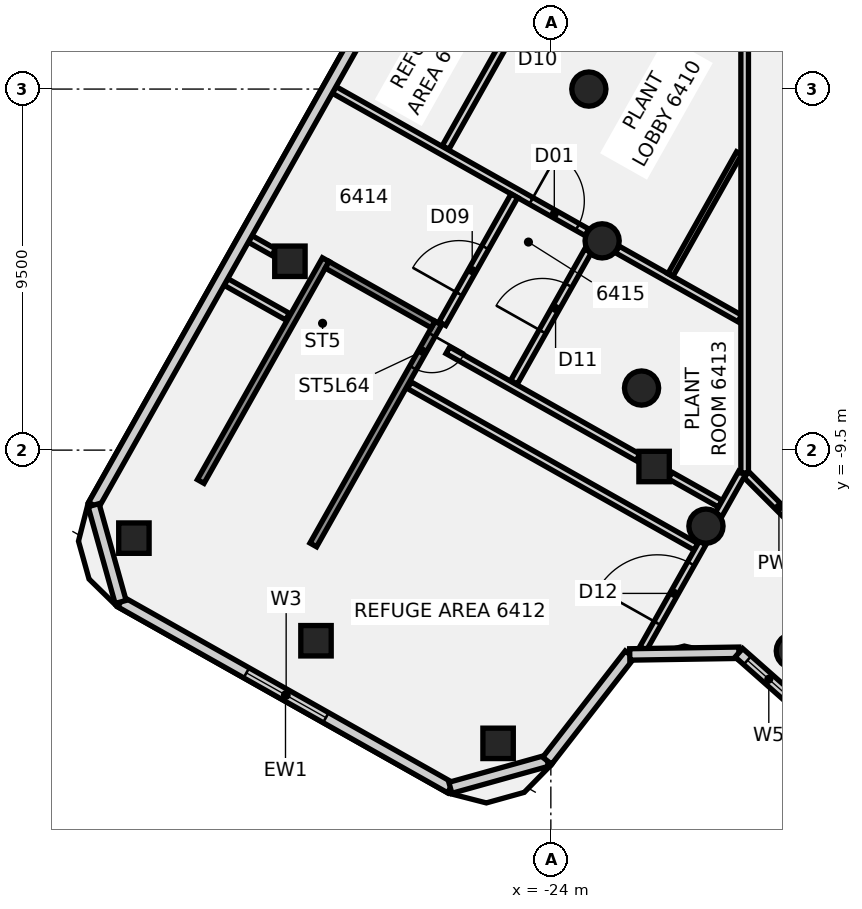
"""IFC4 building model, lengths in metres.
Left out: names, types, materials, properties, quantities, classifications, styles, units other than length and angle.
Written with IfcOpenShell. Run it as: python <this file> out.ifc"""

import sys

from ifc_helpers import new_model, si_unit, direction, frame, frame_2d, origin, origin_2d, place, context, subcontext, project, spatial, polyline, rectangle, circle, outline, extrude, element, fill, save


model = new_model("IFC4")
c1 = context("Model", 3, precision=1e-05, world=origin(), true_north=direction((0.0, 1.0)))
c2 = subcontext(c1, "Body", "Model", "MODEL_VIEW")
j1 = project(units=[si_unit("LENGTHUNIT", "METRE"), si_unit("PLANEANGLEUNIT", "RADIAN")], contexts=[c1])
p1 = place(None, origin())
s1 = spatial("IfcSite", under=j1, at=p1, CompositionType="ELEMENT")
p2 = place(p1, origin())
s2 = spatial("IfcBuilding", under=s1, at=p2, CompositionType="ELEMENT")
p3 = place(p2, frame((0.0, 0.0, 252.3)))
s3 = spatial("IfcBuildingStorey", under=s2, at=p3, CompositionType="ELEMENT", Elevation=252.3)
for number, where, z_axis, x_axis in (
    (1, (-23.0, 0.0, -0.18), (0.0, 0.0, 1.0), (1.0, 0.0, 0.0)),
    (2, (-22.651, -3.994, -0.18), (0.0, 0.0, 1.0), (1.0, 0.0, 0.0)),
    (3, (-21.613, -7.866, -0.18), (0.0, 0.0, 1.0), (1.0, 0.0, 0.0)),
    (4, (-19.919, -11.5, -0.18), (0.0, 0.0, 1.0), (1.0, 0.0, 0.0)),
    (5, (-17.619, -14.784, -0.18), (0.0, 0.0, 1.0), (1.0, 0.0, 0.0)),
):
    element("IfcColumn", number, at=place(p3, frame(where, z_axis=z_axis, x_axis=x_axis)), inside=s3, PredefinedType="COLUMN", context=c2, shape_type="SweptSolid", body=[
        extrude(circle(Radius=0.45, at=origin_2d()), origin(), (0.0, 0.0, 1.0), 4.54),
    ])
for number, where, z_axis, x_axis in (
    (6, (-21.283, -9.931, -0.165), (0.0, 0.0, 1.0), (0.491, 0.871, 0.0)),
    (7, (-30.866, -4.531, -0.165), (0.0, 0.0, 1.0), (0.491, 0.871, 0.0)),
):
    element("IfcColumn", number, at=place(p3, frame(where, z_axis=z_axis, x_axis=x_axis)), inside=s3, PredefinedType="COLUMN", context=c2, shape_type="SweptSolid", body=[
        extrude(rectangle(XDim=0.8, YDim=0.8, at=origin_2d()), origin(), (0.0, 0.0, 1.0), 4.415),
    ])
p4 = place(p3, frame((-34.971, -11.816, -0.147), z_axis=(0.0, 0.0, 1.0), x_axis=(0.490928082303, 0.871200102162, 0.0)))
e8 = element("IfcColumn", 8, at=p4, inside=s3, PredefinedType="COLUMN", context=c2, shape_type="SweptSolid", body=[
    extrude(rectangle(XDim=0.8, YDim=0.8, at=origin_2d()), origin(), (0.0, 0.0, 1.0), 4.397),
])
p5 = place(p3, frame((-30.18, -14.516, -0.142), z_axis=(0.0, 0.0, 1.0), x_axis=(0.490928082303, 0.871200102162, 0.0)))
e9 = element("IfcColumn", 9, at=p5, inside=s3, PredefinedType="COLUMN", context=c2, shape_type="SweptSolid", body=[
    extrude(rectangle(XDim=0.8, YDim=0.8, at=origin_2d()), origin(), (0.0, 0.0, 1.0), 4.392),
])
p6 = place(p3, frame((-25.388, -17.216, -0.136), z_axis=(0.0, 0.0, 1.0), x_axis=(0.490928082303, 0.871200102162, 0.0)))
e10 = element("IfcColumn", 10, at=p6, inside=s3, PredefinedType="COLUMN", context=c2, shape_type="SweptSolid", body=[
    extrude(rectangle(XDim=0.8, YDim=0.8, at=origin_2d()), origin(), (0.0, 0.0, 1.0), 4.386),
])
p7 = place(p3, frame((-18.854, -10.146, 0.0), z_axis=(0.0, 0.0, 1.0), x_axis=(0.707106781187, -0.707106781187, 0.0)))
e11 = element("IfcWall", 11, at=p7, inside=s3, PredefinedType="PARTITIONING", context=c2, shape_type="SweptSolid", body=[
    extrude(rectangle(XDim=2.421, YDim=0.2, at=frame_2d((1.21, 0.0))), origin(), (0.0, 0.0, 1.0), 3.66),
])
p8 = place(p3, frame((-32.549, -5.075, 0.0), z_axis=(0.0, 0.0, 1.0), x_axis=(0.871273731267, -0.490797397308, 0.0)))
e12 = element("IfcWall", 12, at=p8, inside=s3, PredefinedType="PARTITIONING", context=c2, shape_type="SweptSolid", body=[
    extrude(rectangle(XDim=1.859, YDim=0.2, at=frame_2d((0.929, 0.0))), origin(), (0.0, 0.0, 1.0), 3.65),
])
p9 = place(p3, frame((-27.723, -7.793, 0.0), z_axis=(0.0, 0.0, 1.0), x_axis=(0.871250853951, -0.490838007382, 0.0)))
e13 = element("IfcWall", 13, at=p9, inside=s3, PredefinedType="PARTITIONING", context=c2, shape_type="SweptSolid", body=[
    extrude(rectangle(XDim=8.66, YDim=0.2, at=frame_2d((4.33, 0.0))), origin(), (0.0, 0.0, 1.0), 3.65),
])
p10 = place(p3, frame((-31.911, -3.942, 0.0), z_axis=(0.0, 0.0, 1.0), x_axis=(0.871125482332, -0.491060478995, 0.0)))
e14 = element("IfcWall", 14, at=p10, inside=s3, PredefinedType="PARTITIONING", context=c2, shape_type="SweptSolid", body=[
    extrude(rectangle(XDim=0.71, YDim=0.2, at=frame_2d((0.355, 0.0))), origin(), (0.0, 0.0, 1.0), 3.66),
])
p11 = place(p3, frame((-26.711, -6.872, 0.0), z_axis=(0.0, 0.0, 1.0), x_axis=(0.871249420599, -0.490840551612, 0.0)))
e15 = element("IfcWall", 15, at=p11, inside=s3, PredefinedType="PARTITIONING", context=c2, shape_type="SweptSolid", body=[
    extrude(rectangle(XDim=5.741, YDim=0.2, at=frame_2d((2.871, 0.0))), origin(), (0.0, 0.0, 1.0), 3.65),
])
p12 = place(p3, frame((-20.857, -10.17, 0.0), z_axis=(0.0, 0.0, 1.0), x_axis=(0.871269034668, -0.490805734715, 0.0)))
e16 = element("IfcWall", 16, at=p12, inside=s3, PredefinedType="PARTITIONING", context=c2, shape_type="SweptSolid", body=[
    extrude(rectangle(XDim=1.511, YDim=0.2, at=frame_2d((0.756, 0.0))), origin(), (0.0, 0.0, 1.0), 3.66),
])
p13 = place(p3, frame((-29.702, -0.022, 0.0), z_axis=(0.0, 0.0, 1.0), x_axis=(0.871230291911, -0.490874503775, 0.0)))
e17 = element("IfcWall", 17, at=p13, inside=s3, PredefinedType="PARTITIONING", context=c2, shape_type="SweptSolid", body=[
    extrude(rectangle(XDim=7.635, YDim=0.2, at=frame_2d((3.817, 0.0))), origin(), (0.0, 0.0, 1.0), 3.66),
])
p14 = place(p13, frame((5.949, 0.0, 0.0)))
e18 = element("IfcOpeningElement", 18, at=p14, cuts=e17, PredefinedType="OPENING", context=c2, shape_type="SweptSolid", body=[
    extrude(rectangle(XDim=1.4, YDim=2.1, at=frame_2d((0.7, 1.05))), frame((0.0, 0.11, 0.0), z_axis=(0.0, -1.0, 0.0), x_axis=(1.0, 0.0, 0.0)), (0.0, 0.0, 1.0), 0.22),
])
p15 = place(p3, frame((-22.251, -4.22, 0.0), z_axis=(0.0, 0.0, 1.0), x_axis=(0.871238479137, -0.490859972366, 0.0)))
e19 = element("IfcWall", 19, at=p15, inside=s3, PredefinedType="PARTITIONING", context=c2, shape_type="SweptSolid", body=[
    extrude(rectangle(XDim=3.697, YDim=0.2, at=frame_2d((1.849, 0.0))), origin(), (0.0, 0.0, 1.0), 3.66),
])
p16 = place(p3, frame((-26.855, -6.171, 0.0), z_axis=(0.0, 0.0, 1.0), x_axis=(0.49081668525, 0.871262865891, 0.0)))
e20 = element("IfcWall", 20, at=p16, inside=s3, PredefinedType="PARTITIONING", context=c2, shape_type="SweptSolid", body=[
    extrude(rectangle(XDim=3.86, YDim=0.2, at=frame_2d((1.93, 0.0))), origin(), (0.0, 0.0, 1.0), 3.55),
])
p17 = place(p16, frame((0.9, 0.0, 0.0)))
e21 = element("IfcOpeningElement", 21, at=p17, cuts=e20, PredefinedType="OPENING", context=c2, shape_type="SweptSolid", body=[
    extrude(rectangle(XDim=1.4, YDim=2.1, at=frame_2d((0.7, 1.05))), frame((0.0, 0.11, 0.0), z_axis=(0.0, -1.0, 0.0), x_axis=(1.0, 0.0, 0.0)), (0.0, 0.0, 1.0), 0.22),
])
p18 = place(p3, frame((-26.769, -1.537, 0.0), z_axis=(0.0, 0.0, 1.0), x_axis=(0.490938793305, 0.871194066341, 0.0)))
e22 = element("IfcWall", 22, at=p18, inside=s3, PredefinedType="PARTITIONING", context=c2, shape_type="SweptSolid", body=[
    extrude(rectangle(XDim=10.296, YDim=0.2, at=frame_2d((5.148, 0.0))), origin(), (0.0, 0.0, 1.0), 3.66),
])
p19 = place(p18, frame((4.03, 0.0, 0.0)))
e23 = element("IfcOpeningElement", 23, at=p19, cuts=e22, PredefinedType="OPENING", context=c2, shape_type="SweptSolid", body=[
    extrude(rectangle(XDim=1.8, YDim=2.1, at=frame_2d((0.9, 1.05))), frame((0.0, 0.11, 0.0), z_axis=(0.0, -1.0, 0.0), x_axis=(1.0, 0.0, 0.0)), (0.0, 0.0, 1.0), 0.22),
])
p20 = place(p3, frame((-24.97, -7.716, 0.0), z_axis=(0.0, 0.0, 1.0), x_axis=(0.490949481797, 0.871188043033, 0.0)))
e24 = element("IfcWall", 24, at=p20, inside=s3, PredefinedType="PARTITIONING", context=c2, shape_type="SweptSolid", body=[
    extrude(rectangle(XDim=3.974, YDim=0.2, at=frame_2d((1.987, 0.0))), origin(), (0.0, 0.0, 1.0), 3.55),
])
p21 = place(p20, frame((1.53, 0.0, 0.0)))
e25 = element("IfcOpeningElement", 25, at=p21, cuts=e24, PredefinedType="OPENING", context=c2, shape_type="SweptSolid", body=[
    extrude(rectangle(XDim=1.4, YDim=2.1, at=frame_2d((0.7, 1.05))), frame((0.0, 0.11, 0.0), z_axis=(0.0, -1.0, 0.0), x_axis=(1.0, 0.0, 0.0)), (0.0, 0.0, 1.0), 0.22),
])
p22 = place(p3, frame((-21.571, -14.72, 0.0), z_axis=(0.0, 0.0, 1.0), x_axis=(0.490968764071, 0.871177176415, 0.0)))
e26 = element("IfcWall", 26, at=p22, inside=s3, PredefinedType="PARTITIONING", context=c2, shape_type="SweptSolid", body=[
    extrude(rectangle(XDim=3.194, YDim=0.2, at=frame_2d((1.597, 0.0))), origin(), (0.0, 0.0, 1.0), 3.66),
])
p23 = place(p22, frame((0.764, 0.0, 0.0)))
e27 = element("IfcOpeningElement", 27, at=p23, cuts=e26, PredefinedType="OPENING", context=c2, shape_type="SweptSolid", body=[
    extrude(rectangle(XDim=1.8, YDim=2.1, at=frame_2d((0.9, 1.05))), frame((0.0, 0.11, 0.0), z_axis=(0.0, -1.0, 0.0), x_axis=(1.0, 0.0, 0.0)), (0.0, 0.0, 1.0), 0.22),
])
p24 = place(p3, frame((-19.588, -11.202, 0.0), z_axis=(0.0, 0.0, 1.0), x_axis=(0.490922315128, 0.871203351985, 0.0)))
e28 = element("IfcWall", 28, at=p24, inside=s3, PredefinedType="PARTITIONING", context=c2, shape_type="SweptSolid", body=[
    extrude(rectangle(XDim=1.262, YDim=0.2, at=frame_2d((0.631, 0.0))), origin(), (0.0, 0.0, 1.0), 3.66),
])
p25 = place(p3, frame((-20.854, -4.893, 0.0), z_axis=(0.0, 0.0, 1.0), x_axis=(0.490808992491, 0.87126719948, 0.0)))
e29 = element("IfcWall", 29, at=p25, inside=s3, PredefinedType="PARTITIONING", context=c2, shape_type="SweptSolid", body=[
    extrude(rectangle(XDim=3.681, YDim=0.15, at=frame_2d((1.841, 0.0))), origin(), (0.0, 0.0, 1.0), 3.66),
])
p26 = place(p3, frame((-18.9, -10.1, 0.0), z_axis=(0.0, 0.0, 1.0), x_axis=(0.0, 1.0, 0.0)))
e30 = element("IfcWall", 30, at=p26, inside=s3, PredefinedType="PARTITIONING", context=c2, shape_type="SweptSolid", body=[
    extrude(rectangle(XDim=20.2, YDim=0.2, at=frame_2d((10.1, 0.0))), origin(), (0.0, 0.0, 1.0), 3.66),
])
p27 = place(p26, frame((11.976, 0.0, 0.0)))
e31 = element("IfcOpeningElement", 31, at=p27, cuts=e30, PredefinedType="OPENING", context=c2, shape_type="SweptSolid", body=[
    extrude(rectangle(XDim=1.8, YDim=2.1, at=frame_2d((0.9, 1.05))), frame((0.0, 0.11, 0.0), z_axis=(0.0, -1.0, 0.0), x_axis=(1.0, 0.0, 0.0)), (0.0, 0.0, 1.0), 0.22),
])
p28 = place(p3, frame((-35.321, -13.495, 0.0), z_axis=(0.0, 0.0, 1.0), x_axis=(0.871203482324, -0.490922083825, 0.0)))
e32 = element("IfcWall", 32, at=p28, inside=s3, PredefinedType="SOLIDWALL", context=c2, shape_type="SweptSolid", body=[
    extrude(rectangle(XDim=9.961, YDim=0.3, at=frame_2d((4.98, 0.0))), origin(), (0.0, 0.0, 1.0), 4.36),
])
p29 = place(p28, frame((3.8, 0.0, 1.4)))
e33 = element("IfcOpeningElement", 33, at=p29, cuts=e32, PredefinedType="OPENING", context=c2, shape_type="SweptSolid", body=[
    extrude(rectangle(XDim=2.4, YDim=2.1, at=frame_2d((1.2, 1.05))), frame((0.0, 0.16, 0.0), z_axis=(0.0, -1.0, 0.0), x_axis=(1.0, 0.0, 0.0)), (0.0, 0.0, 1.0), 0.32),
])
p30 = place(p3, frame((-26.644, -18.385, 0.0), z_axis=(0.0, 0.0, 1.0), x_axis=(0.963126802739, 0.269047880209, 0.0)))
e34 = element("IfcWall", 34, at=p30, inside=s3, PredefinedType="SOLIDWALL", context=c2, shape_type="SweptSolid", body=[
    extrude(rectangle(XDim=2.645, YDim=0.3, at=frame_2d((1.323, 0.0))), origin(), (0.0, 0.0, 1.0), 4.36),
])
p31 = place(p3, frame((-24.096, -17.673, 0.0), z_axis=(0.0, 0.0, 1.0), x_axis=(0.613382087815, 0.789786309294, 0.0)))
e35 = element("IfcWall", 35, at=p31, inside=s3, PredefinedType="SOLIDWALL", context=c2, shape_type="SweptSolid", body=[
    extrude(rectangle(XDim=3.542, YDim=0.3, at=frame_2d((1.771, 0.0))), origin(), (0.0, 0.0, 1.0), 4.36),
])
p32 = place(p3, frame((-21.924, -14.876, 0.0), z_axis=(0.0, 0.0, 1.0), x_axis=(0.999879048983, 0.015552729789, 0.0)))
e36 = element("IfcWall", 36, at=p32, inside=s3, PredefinedType="SOLIDWALL", context=c2, shape_type="SweptSolid", body=[
    extrude(rectangle(XDim=2.873, YDim=0.3, at=frame_2d((1.436, 0.0))), origin(), (0.0, 0.0, 1.0), 4.36),
])
p33 = place(p3, frame((-19.051, -14.832, 0.0), z_axis=(0.0, 0.0, 1.0), x_axis=(0.749217958037, -0.662323524688, 0.0)))
e37 = element("IfcWall", 37, at=p33, inside=s3, PredefinedType="SOLIDWALL", context=c2, shape_type="SweptSolid", body=[
    extrude(rectangle(XDim=2.104, YDim=0.3, at=frame_2d((1.052, 0.0))), origin(), (0.0, 0.0, 1.0), 4.36),
])
p34 = place(p33, frame((0.3, 0.0, 1.4)))
e38 = element("IfcOpeningElement", 38, at=p34, cuts=e37, PredefinedType="OPENING", context=c2, shape_type="SweptSolid", body=[
    extrude(rectangle(XDim=1.5, YDim=1.0, at=frame_2d((0.75, 0.5))), frame((0.0, 0.16, 0.0), z_axis=(0.0, -1.0, 0.0), x_axis=(1.0, 0.0, 0.0)), (0.0, 0.0, 1.0), 0.32),
])
p35 = place(p3, frame((-28.791, 1.903, 0.0), z_axis=(0.0, 0.0, 1.0), x_axis=(-0.490929020031, -0.871199573744, 0.0)))
e39 = element("IfcWall", 39, at=p35, inside=s3, PredefinedType="SOLIDWALL", context=c2, shape_type="SweptSolid", body=[
    extrude(rectangle(XDim=14.751, YDim=0.3, at=frame_2d((7.375, 0.0))), origin(), (0.0, 0.0, 1.0), 4.36),
])
p36 = place(p3, frame((-36.032, -10.948, 0.0), z_axis=(0.0, 0.0, 1.0), x_axis=(0.268862712844, -0.963178509749, 0.0)))
e40 = element("IfcWall", 40, at=p36, inside=s3, PredefinedType="SOLIDWALL", context=c2, shape_type="SweptSolid", body=[
    extrude(rectangle(XDim=2.644, YDim=0.3, at=frame_2d((1.322, 0.0))), origin(), (0.0, 0.0, 1.0), 4.36),
])
p37 = place(p3, frame((-26.962, -6.157, -0.18), z_axis=(0.0, 0.0, 1.0), x_axis=(-0.490918532451, -0.871205483509, 0.0)))
e41 = element("IfcWall", 41, at=p37, inside=s3, PredefinedType="SHEAR", context=c2, shape_type="SweptSolid", body=[
    extrude(rectangle(XDim=6.7, YDim=0.2, at=frame_2d((3.35, 0.0))), origin(), (0.0, 0.0, 1.0), 3.73),
])
p38 = place(p37, frame((0.35, 0.0, 0.0)))
e42 = element("IfcOpeningElement", 42, at=p38, cuts=e41, PredefinedType="OPENING", context=c2, shape_type="SweptSolid", body=[
    extrude(rectangle(XDim=1.0, YDim=2.1, at=frame_2d((0.5, 1.05))), frame((0.0, 0.11, 0.0), z_axis=(0.0, -1.0, 0.0), x_axis=(1.0, 0.0, 0.0)), (0.0, 0.0, 1.0), 0.22),
])
p39 = place(p3, frame((-29.924, -4.488, -0.18), z_axis=(0.0, 0.0, 1.0), x_axis=(-0.490946189567, -0.871189898328, 0.0)))
e43 = element("IfcWall", 43, at=p39, inside=s3, PredefinedType="SHEAR", context=c2, shape_type="SweptSolid", body=[
    extrude(rectangle(XDim=6.7, YDim=0.2, at=frame_2d((3.35, 0.0))), origin(), (0.0, 0.0, 1.0), 3.73),
])
p40 = place(p3, frame((-29.886, -4.624, -0.18), z_axis=(0.0, 0.0, 1.0), x_axis=(0.871208567754, -0.490913058975, 0.0)))
e44 = element("IfcWall", 44, at=p40, inside=s3, PredefinedType="SHEAR", context=c2, shape_type="SweptSolid", body=[
    extrude(rectangle(XDim=3.2, YDim=0.2, at=frame_2d((1.6, 0.0))), origin(), (0.0, 0.0, 1.0), 3.73),
])
p41 = place(p3, frame((0.0, 0.0, -0.18)))
e45 = element("IfcWall", 45, at=p41, inside=s3, PredefinedType="SHEAR", context=c2, shape_type="SweptSolid", body=[
    extrude(outline(polyline([(-33.028, -10.2), (-33.126, -10.374), (-30.338, -11.945), (-30.24, -11.771), (-33.028, -10.2)])), origin(), (0.0, 0.0, 1.0), 3.73),
])
p42 = place(p14, origin())
e46 = element("IfcDoor", 46, at=p42, inside=s3, OperationType="DOUBLE_DOOR_SINGLE_SWING", PredefinedType="DOOR", context=c2, shape_type="SweptSolid", body=[
    extrude(rectangle(XDim=1.4, YDim=2.1, at=frame_2d((0.7, 1.05))), frame((0.0, 0.025, 0.0), z_axis=(0.0, -1.0, 0.0), x_axis=(1.0, 0.0, 0.0)), (0.0, 0.0, 1.0), 0.05),
])
fill(e18, e46)
p43 = place(p17, origin())
e47 = element("IfcDoor", 47, at=p43, inside=s3, OperationType="DOUBLE_DOOR_SINGLE_SWING", PredefinedType="DOOR", context=c2, shape_type="SweptSolid", body=[
    extrude(rectangle(XDim=1.4, YDim=2.1, at=frame_2d((0.7, 1.05))), frame((0.0, 0.025, 0.0), z_axis=(0.0, -1.0, 0.0), x_axis=(1.0, 0.0, 0.0)), (0.0, 0.0, 1.0), 0.05),
])
fill(e21, e47)
p44 = place(p21, frame((1.4, 0.0, 0.0), z_axis=(0.0, 0.0, 1.0), x_axis=(-1.0, 0.0, 0.0)))
e48 = element("IfcDoor", 48, at=p44, inside=s3, OperationType="DOUBLE_DOOR_SINGLE_SWING", PredefinedType="DOOR", context=c2, shape_type="SweptSolid", body=[
    extrude(rectangle(XDim=1.4, YDim=2.1, at=frame_2d((0.7, 1.05))), frame((0.0, 0.025, 0.0), z_axis=(0.0, -1.0, 0.0), x_axis=(1.0, 0.0, 0.0)), (0.0, 0.0, 1.0), 0.05),
])
fill(e25, e48)
p45 = place(p23, origin())
e49 = element("IfcDoor", 49, at=p45, inside=s3, OperationType="DOUBLE_DOOR_SINGLE_SWING", PredefinedType="DOOR", context=c2, shape_type="SweptSolid", body=[
    extrude(rectangle(XDim=1.8, YDim=2.1, at=frame_2d((0.9, 1.05))), frame((0.0, 0.025, 0.0), z_axis=(0.0, -1.0, 0.0), x_axis=(1.0, 0.0, 0.0)), (0.0, 0.0, 1.0), 0.05),
])
fill(e27, e49)
p46 = place(p29, origin())
e50 = element("IfcWindow", 50, at=p46, inside=s3, PartitioningType="SINGLE_PANEL", PredefinedType="WINDOW", context=c2, shape_type="SweptSolid", body=[
    extrude(rectangle(XDim=2.4, YDim=2.1, at=frame_2d((1.2, 1.05))), frame((0.0, 0.03, 0.0), z_axis=(0.0, -1.0, 0.0), x_axis=(1.0, 0.0, 0.0)), (0.0, 0.0, 1.0), 0.06),
])
fill(e33, e50)
p47 = place(p34, origin())
e51 = element("IfcWindow", 51, at=p47, inside=s3, PartitioningType="SINGLE_PANEL", PredefinedType="WINDOW", context=c2, shape_type="SweptSolid", body=[
    extrude(rectangle(XDim=1.5, YDim=1.0, at=frame_2d((0.75, 0.5))), frame((0.0, 0.03, 0.0), z_axis=(0.0, -1.0, 0.0), x_axis=(1.0, 0.0, 0.0)), (0.0, 0.0, 1.0), 0.06),
])
fill(e38, e51)
p48 = place(p38, origin())
e52 = element("IfcDoor", 52, at=p48, inside=s3, OperationType="SINGLE_SWING_LEFT", PredefinedType="DOOR", context=c2, shape_type="SweptSolid", body=[
    extrude(rectangle(XDim=1.0, YDim=2.1, at=frame_2d((0.5, 1.05))), frame((0.0, 0.025, 0.0), z_axis=(0.0, -1.0, 0.0), x_axis=(1.0, 0.0, 0.0)), (0.0, 0.0, 1.0), 0.05),
])
fill(e42, e52)
save(model, sys.argv[1])
